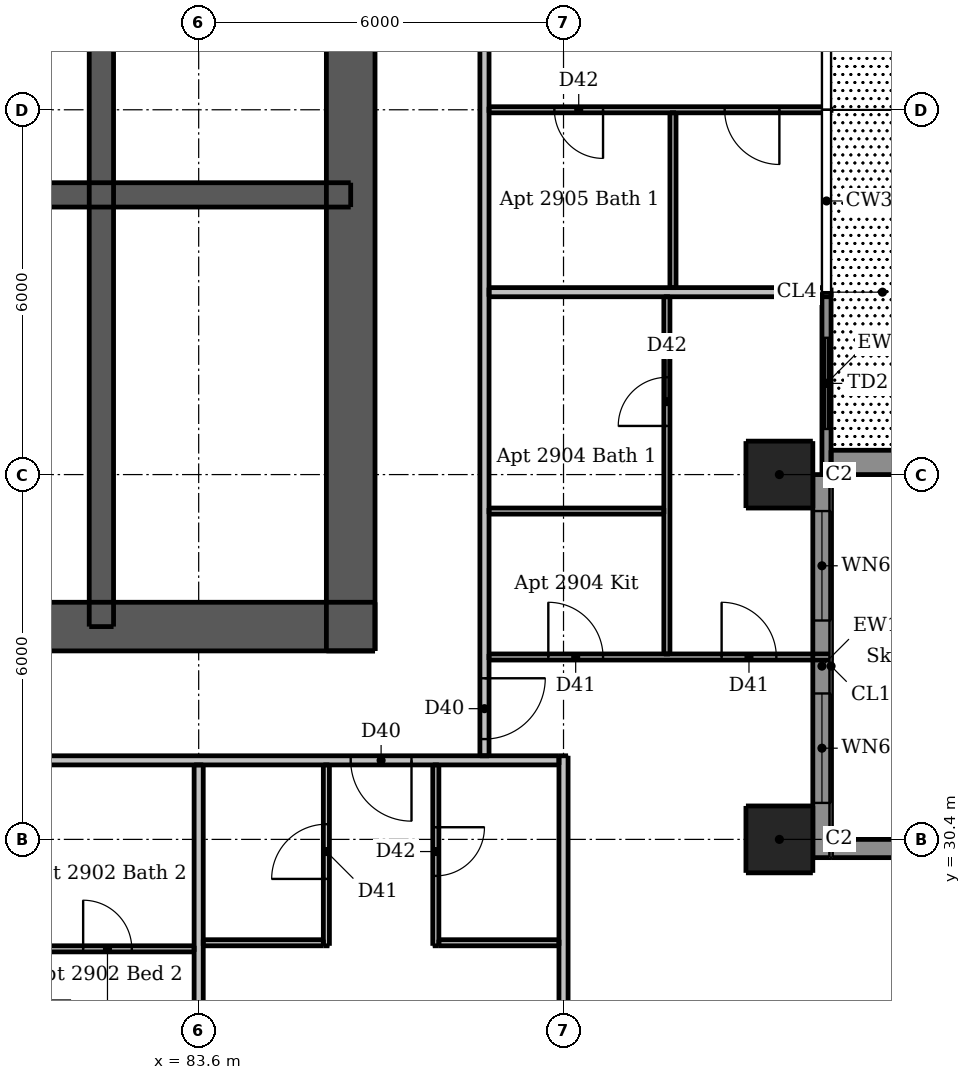
"""IFC4 building model, lengths in metres.
Left out: names, types, materials, properties, quantities, classifications, styles, units other than length and angle.
Written with IfcOpenShell. Run it as: python <this file> out.ifc"""

import sys

from ifc_helpers import new_model, si_unit, direction, frame, frame_2d, origin, origin_2d, place, context, subcontext, project, spatial, rectangle, extrude, element, fill, save


model = new_model("IFC4")
c1 = context("Model", 3, precision=1e-05, world=origin(), true_north=direction((0.0, 1.0)))
c2 = subcontext(c1, "Body", "Model", "MODEL_VIEW")
j1 = project(units=[si_unit("LENGTHUNIT", "METRE"), si_unit("PLANEANGLEUNIT", "RADIAN")], contexts=[c1])
p1 = place(None, origin())
s1 = spatial("IfcSite", under=j1, at=p1, CompositionType="ELEMENT")
p2 = place(p1, origin())
s2 = spatial("IfcBuilding", under=s1, at=p2, CompositionType="ELEMENT")
p3 = place(p2, frame((0.0, 0.0, 108.4)))
s3 = spatial("IfcBuildingStorey", under=s2, at=p3, CompositionType="ELEMENT", Elevation=108.4)
p4 = place(p3, frame((62.5, 33.9, 0.0), z_axis=(0.0, 0.0, 1.0), x_axis=(1.0, 0.0, 0.0)))
e1 = element("IfcWall", 1, at=p4, inside=s3, PredefinedType="SHEAR", context=c2, shape_type="SweptSolid", body=[
    extrude(rectangle(XDim=24.0, YDim=0.8, at=frame_2d((12.0, 0.0))), origin(), (0.0, 0.0, 1.0), 3.05),
])
p5 = place(p4, frame((2.0, 0.0, 0.0)))
e2 = element("IfcOpeningElement", 2, at=p5, cuts=e1, PredefinedType="OPENING", context=c2, shape_type="SweptSolid", body=[
    extrude(rectangle(XDim=1.1, YDim=2.1, at=frame_2d((0.55, 1.05))), frame((0.0, 0.41, 0.0), z_axis=(0.0, -1.0, 0.0), x_axis=(1.0, 0.0, 0.0)), (0.0, 0.0, 1.0), 0.82),
])
p6 = place(p4, frame((20.9, 0.0, 0.0)))
e3 = element("IfcOpeningElement", 3, at=p6, cuts=e1, PredefinedType="OPENING", context=c2, shape_type="SweptSolid", body=[
    extrude(rectangle(XDim=1.1, YDim=2.1, at=frame_2d((0.55, 1.05))), frame((0.0, 0.41, 0.0), z_axis=(0.0, -1.0, 0.0), x_axis=(1.0, 0.0, 0.0)), (0.0, 0.0, 1.0), 0.82),
])
p7 = place(p4, frame((8.0, 0.0, 0.0)))
e4 = element("IfcOpeningElement", 4, at=p7, cuts=e1, PredefinedType="OPENING", context=c2, shape_type="SweptSolid", body=[
    extrude(rectangle(XDim=1.1, YDim=2.1, at=frame_2d((0.55, 1.05))), frame((0.0, 0.41, 0.0), z_axis=(0.0, -1.0, 0.0), x_axis=(1.0, 0.0, 0.0)), (0.0, 0.0, 1.0), 0.82),
])
p8 = place(p4, frame((16.363, 0.0, 0.0)))
e5 = element("IfcOpeningElement", 5, at=p8, cuts=e1, PredefinedType="OPENING", context=c2, shape_type="SweptSolid", body=[
    extrude(rectangle(XDim=0.9, YDim=2.1, at=frame_2d((0.45, 1.05))), frame((0.0, 0.41, 0.0), z_axis=(0.0, -1.0, 0.0), x_axis=(1.0, 0.0, 0.0)), (0.0, 0.0, 1.0), 0.82),
])
p9 = place(p3, frame((86.1, 33.5, 0.0), z_axis=(0.0, 0.0, 1.0), x_axis=(0.0, 1.0, 0.0)))
e6 = element("IfcWall", 6, at=p9, inside=s3, PredefinedType="SHEAR", context=c2, shape_type="SweptSolid", body=[
    extrude(rectangle(XDim=24.0, YDim=0.8, at=frame_2d((12.0, 0.0))), origin(), (0.0, 0.0, 1.0), 3.05),
])
p10 = place(p9, frame((11.2, 0.0, 0.0)))
e7 = element("IfcOpeningElement", 7, at=p10, cuts=e6, PredefinedType="OPENING", context=c2, shape_type="SweptSolid", body=[
    extrude(rectangle(XDim=1.6, YDim=2.1, at=frame_2d((0.8, 1.05))), frame((0.0, 0.41, 0.0), z_axis=(0.0, -1.0, 0.0), x_axis=(1.0, 0.0, 0.0)), (0.0, 0.0, 1.0), 0.82),
])
p11 = place(p3, frame((62.9, 41.0, 0.0), z_axis=(0.0, 0.0, 1.0), x_axis=(1.0, 0.0, 0.0)))
e8 = element("IfcWall", 8, at=p11, inside=s3, PredefinedType="SHEAR", context=c2, shape_type="SweptSolid", body=[
    extrude(rectangle(XDim=23.2, YDim=0.4, at=frame_2d((11.6, 0.0))), origin(), (0.0, 0.0, 1.0), 3.05),
])
p12 = place(p3, frame((82.0, 33.9, 0.0), z_axis=(0.0, 0.0, 1.0), x_axis=(0.0, 1.0, 0.0)))
e9 = element("IfcWall", 9, at=p12, inside=s3, PredefinedType="SHEAR", context=c2, shape_type="SweptSolid", body=[
    extrude(rectangle(XDim=10.0, YDim=0.4, at=frame_2d((5.0, 0.0))), origin(), (0.0, 0.0, 1.0), 3.05),
])
for number, where, z_axis, x_axis in (
    (10, (93.15, 30.4, 0.0), (0.0, 0.0, 1.0), (1.0, 0.0, 0.0)),
    (11, (93.15, 36.4, 0.0), (0.0, 0.0, 1.0), (1.0, 0.0, 0.0)),
):
    element("IfcColumn", number, at=place(p3, frame(where, z_axis=z_axis, x_axis=x_axis)), inside=s3, PredefinedType="COLUMN", context=c2, shape_type="SweptSolid", body=[
        extrude(rectangle(XDim=1.1, YDim=1.1, at=origin_2d()), origin(), (0.0, 0.0, 1.0), 3.05),
    ])
p13 = place(p3, frame((100.0, 30.25, 0.0), z_axis=(0.0, 0.0, 1.0), x_axis=(-1.0, 0.0, 0.0)))
e12 = element("IfcWall", 12, at=p13, inside=s3, PredefinedType="SOLIDWALL", context=c2, shape_type="SweptSolid", body=[
    extrude(rectangle(XDim=6.0, YDim=0.3, at=frame_2d((3.0, 0.0))), origin(), (0.0, 0.0, 1.0), 3.05),
])
p14 = place(p13, frame((1.8, 0.0, 0.15)))
e13 = element("IfcOpeningElement", 13, at=p14, cuts=e12, PredefinedType="OPENING", context=c2, shape_type="SweptSolid", body=[
    extrude(rectangle(XDim=2.4, YDim=2.1, at=frame_2d((1.2, 1.05))), frame((0.0, 0.16, 0.0), z_axis=(0.0, -1.0, 0.0), x_axis=(1.0, 0.0, 0.0)), (0.0, 0.0, 1.0), 0.32),
])
p15 = place(p3, frame((93.85, 30.1, 0.0), z_axis=(0.0, 0.0, 1.0), x_axis=(0.0, 1.0, 0.0)))
e14 = element("IfcWall", 14, at=p15, inside=s3, PredefinedType="SOLIDWALL", context=c2, shape_type="SweptSolid", body=[
    extrude(rectangle(XDim=6.3, YDim=0.3, at=frame_2d((3.15, 0.0))), origin(), (0.0, 0.0, 1.0), 3.05),
])
p16 = place(p15, frame((0.9, 0.0, 0.15)))
e15 = element("IfcOpeningElement", 15, at=p16, cuts=e14, PredefinedType="OPENING", context=c2, shape_type="SweptSolid", body=[
    extrude(rectangle(XDim=1.8, YDim=2.1, at=frame_2d((0.9, 1.05))), frame((0.0, 0.16, 0.0), z_axis=(0.0, -1.0, 0.0), x_axis=(1.0, 0.0, 0.0)), (0.0, 0.0, 1.0), 0.32),
])
p17 = place(p15, frame((3.9, 0.0, 0.15)))
e16 = element("IfcOpeningElement", 16, at=p17, cuts=e14, PredefinedType="OPENING", context=c2, shape_type="SweptSolid", body=[
    extrude(rectangle(XDim=1.8, YDim=2.1, at=frame_2d((0.9, 1.05))), frame((0.0, 0.16, 0.0), z_axis=(0.0, -1.0, 0.0), x_axis=(1.0, 0.0, 0.0)), (0.0, 0.0, 1.0), 0.32),
])
p18 = place(p3, frame((93.925, 36.4, 0.0), z_axis=(0.0, 0.0, 1.0), x_axis=(0.0, 1.0, 0.0)))
e17 = element("IfcWall", 17, at=p18, inside=s3, PredefinedType="SOLIDWALL", context=c2, shape_type="SweptSolid", body=[
    extrude(rectangle(XDim=3.0, YDim=0.15, at=frame_2d((1.5, 0.0))), origin(), (0.0, 0.0, 1.0), 3.05),
])
p19 = place(p18, frame((0.75, 0.0, 0.0)))
e18 = element("IfcOpeningElement", 18, at=p19, cuts=e17, PredefinedType="OPENING", context=c2, shape_type="SweptSolid", body=[
    extrude(rectangle(XDim=1.5, YDim=2.4, at=frame_2d((0.75, 1.2))), frame((0.0, 0.085, 0.0), z_axis=(0.0, -1.0, 0.0), x_axis=(1.0, 0.0, 0.0)), (0.0, 0.0, 1.0), 0.17),
])
p20 = place(p3, frame((94.0, 36.6, 0.03), z_axis=(0.0, 0.0, 1.0), x_axis=(1.0, 0.0, 0.0)))
e19 = element("IfcWall", 19, at=p20, inside=s3, PredefinedType="PARAPET", context=c2, shape_type="SweptSolid", body=[
    extrude(rectangle(XDim=2.6, YDim=0.4, at=frame_2d((1.3, 0.0))), origin(), (0.0, 0.0, 1.0), 1.1),
])
p21 = place(p3, frame((85.7, 28.65, 0.0), z_axis=(0.0, 0.0, 1.0), x_axis=(0.0, 1.0, 0.0)))
e20 = element("IfcWall", 20, at=p21, inside=s3, PredefinedType="PARTITIONING", context=c2, shape_type="SweptSolid", body=[
    extrude(rectangle(XDim=2.975, YDim=0.1, at=frame_2d((1.488, 0.0))), origin(), (0.0, 0.0, 1.0), 3.05),
])
p22 = place(p21, frame((1.1, 0.0, 0.0)))
e21 = element("IfcOpeningElement", 21, at=p22, cuts=e20, PredefinedType="OPENING", context=c2, shape_type="SweptSolid", body=[
    extrude(rectangle(XDim=0.9, YDim=2.1, at=frame_2d((0.45, 1.05))), frame((0.0, 0.06, 0.0), z_axis=(0.0, -1.0, 0.0), x_axis=(1.0, 0.0, 0.0)), (0.0, 0.0, 1.0), 0.12),
])
p23 = place(p3, frame((87.5, 31.625, 0.0), z_axis=(0.0, 0.0, 1.0), x_axis=(0.0, -1.0, 0.0)))
e22 = element("IfcWall", 22, at=p23, inside=s3, PredefinedType="PARTITIONING", context=c2, shape_type="SweptSolid", body=[
    extrude(rectangle(XDim=2.975, YDim=0.1, at=frame_2d((1.488, 0.0))), origin(), (0.0, 0.0, 1.0), 3.05),
])
p24 = place(p23, frame((1.025, 0.0, 0.0)))
e23 = element("IfcOpeningElement", 23, at=p24, cuts=e22, PredefinedType="OPENING", context=c2, shape_type="SweptSolid", body=[
    extrude(rectangle(XDim=0.8, YDim=2.1, at=frame_2d((0.4, 1.05))), frame((0.0, 0.06, 0.0), z_axis=(0.0, -1.0, 0.0), x_axis=(1.0, 0.0, 0.0)), (0.0, 0.0, 1.0), 0.12),
])
p25 = place(p3, frame((91.3, 33.45, 0.0), z_axis=(0.0, 0.0, 1.0), x_axis=(0.0, 1.0, 0.0)))
e24 = element("IfcWall", 24, at=p25, inside=s3, PredefinedType="PARTITIONING", context=c2, shape_type="SweptSolid", body=[
    extrude(rectangle(XDim=5.875, YDim=0.1, at=frame_2d((2.938, 0.0))), origin(), (0.0, 0.0, 1.0), 3.05),
])
p26 = place(p25, frame((3.75, 0.0, 0.0)))
e25 = element("IfcOpeningElement", 25, at=p26, cuts=e24, PredefinedType="OPENING", context=c2, shape_type="SweptSolid", body=[
    extrude(rectangle(XDim=0.8, YDim=2.1, at=frame_2d((0.4, 1.05))), frame((0.0, 0.06, 0.0), z_axis=(0.0, -1.0, 0.0), x_axis=(1.0, 0.0, 0.0)), (0.0, 0.0, 1.0), 0.12),
])
p27 = place(p3, frame((91.4, 39.475, 0.0), z_axis=(0.0, 0.0, 1.0), x_axis=(0.0, 1.0, 0.0)))
e26 = element("IfcWall", 26, at=p27, inside=s3, PredefinedType="PARTITIONING", context=c2, shape_type="SweptSolid", body=[
    extrude(rectangle(XDim=2.875, YDim=0.1, at=frame_2d((1.438, 0.0))), origin(), (0.0, 0.0, 1.0), 3.05),
])
p28 = place(p3, frame((94.0, 42.4, 0.0), z_axis=(0.0, 0.0, 1.0), x_axis=(-1.0, 0.0, 0.0)))
e27 = element("IfcWall", 27, at=p28, inside=s3, PredefinedType="PARTITIONING", context=c2, shape_type="SweptSolid", body=[
    extrude(rectangle(XDim=5.625, YDim=0.1, at=frame_2d((2.812, 0.0))), origin(), (0.0, 0.0, 1.0), 2.516),
])
p29 = place(p28, frame((0.85, 0.0, 0.0)))
e28 = element("IfcOpeningElement", 28, at=p29, cuts=e27, PredefinedType="OPENING", context=c2, shape_type="SweptSolid", body=[
    extrude(rectangle(XDim=0.9, YDim=2.1, at=frame_2d((0.45, 1.05))), frame((0.0, 0.06, 0.0), z_axis=(0.0, -1.0, 0.0), x_axis=(1.0, 0.0, 0.0)), (0.0, 0.0, 1.0), 0.12),
])
p30 = place(p28, frame((3.75, 0.0, 0.0)))
e29 = element("IfcOpeningElement", 29, at=p30, cuts=e27, PredefinedType="OPENING", context=c2, shape_type="SweptSolid", body=[
    extrude(rectangle(XDim=0.8, YDim=2.1, at=frame_2d((0.4, 1.05))), frame((0.0, 0.06, 0.0), z_axis=(0.0, -1.0, 0.0), x_axis=(1.0, 0.0, 0.0)), (0.0, 0.0, 1.0), 0.12),
])
p31 = place(p3, frame((88.375, 35.8, 0.0), z_axis=(0.0, 0.0, 1.0), x_axis=(1.0, 0.0, 0.0)))
e30 = element("IfcWall", 30, at=p31, inside=s3, PredefinedType="PARTITIONING", context=c2, shape_type="SweptSolid", body=[
    extrude(rectangle(XDim=2.875, YDim=0.1, at=frame_2d((1.438, 0.0))), origin(), (0.0, 0.0, 1.0), 3.05),
])
p32 = place(p3, frame((88.375, 33.4, 0.0), z_axis=(0.0, 0.0, 1.0), x_axis=(1.0, 0.0, 0.0)))
e31 = element("IfcWall", 31, at=p32, inside=s3, PredefinedType="PARTITIONING", context=c2, shape_type="SweptSolid", body=[
    extrude(rectangle(XDim=5.625, YDim=0.1, at=frame_2d((2.812, 0.0))), origin(), (0.0, 0.0, 1.0), 3.05),
])
p33 = place(p32, frame((0.975, 0.0, 0.0)))
e32 = element("IfcOpeningElement", 32, at=p33, cuts=e31, PredefinedType="OPENING", context=c2, shape_type="SweptSolid", body=[
    extrude(rectangle(XDim=0.9, YDim=2.1, at=frame_2d((0.45, 1.05))), frame((0.0, 0.06, 0.0), z_axis=(0.0, -1.0, 0.0), x_axis=(1.0, 0.0, 0.0)), (0.0, 0.0, 1.0), 0.12),
])
p34 = place(p32, frame((3.825, 0.0, 0.0)))
e33 = element("IfcOpeningElement", 33, at=p34, cuts=e31, PredefinedType="OPENING", context=c2, shape_type="SweptSolid", body=[
    extrude(rectangle(XDim=0.9, YDim=2.1, at=frame_2d((0.45, 1.05))), frame((0.0, 0.06, 0.0), z_axis=(0.0, -1.0, 0.0), x_axis=(1.0, 0.0, 0.0)), (0.0, 0.0, 1.0), 0.12),
])
for number, where, z_axis, x_axis in (
    (34, (83.675, 28.7, 0.0), (0.0, 0.0, 1.0), (1.0, 0.0, 0.0)),
    (35, (87.55, 28.7, 0.0), (0.0, 0.0, 1.0), (1.0, 0.0, 0.0)),
):
    element("IfcWall", number, at=place(p3, frame(where, z_axis=z_axis, x_axis=x_axis)), inside=s3, PredefinedType="PARTITIONING", context=c2, shape_type="SweptSolid", body=[
        extrude(rectangle(XDim=1.975, YDim=0.1, at=frame_2d((0.987, 0.0))), origin(), (0.0, 0.0, 1.0), 3.05),
    ])
p35 = place(p3, frame((78.25, 28.6, 0.0), z_axis=(0.0, 0.0, 1.0), x_axis=(1.0, 0.0, 0.0)))
e36 = element("IfcWall", 36, at=p35, inside=s3, PredefinedType="PARTITIONING", context=c2, shape_type="SweptSolid", body=[
    extrude(rectangle(XDim=5.275, YDim=0.1, at=frame_2d((2.637, 0.0))), origin(), (0.0, 0.0, 1.0), 3.05),
])
p36 = place(p35, frame((3.45, 0.0, 0.0)))
e37 = element("IfcOpeningElement", 37, at=p36, cuts=e36, PredefinedType="OPENING", context=c2, shape_type="SweptSolid", body=[
    extrude(rectangle(XDim=0.8, YDim=2.1, at=frame_2d((0.4, 1.05))), frame((0.0, 0.06, 0.0), z_axis=(0.0, -1.0, 0.0), x_axis=(1.0, 0.0, 0.0)), (0.0, 0.0, 1.0), 0.12),
])
p37 = place(p3, frame((83.6, 26.0, 0.0), z_axis=(0.0, 0.0, 1.0), x_axis=(0.0, 1.0, 0.0)))
e38 = element("IfcWall", 38, at=p37, inside=s3, PredefinedType="PARTITIONING", context=c2, shape_type="SweptSolid", body=[
    extrude(rectangle(XDim=5.625, YDim=0.15, at=frame_2d((2.812, 0.0))), origin(), (0.0, 0.0, 1.0), 2.59),
])
p38 = place(p3, frame((88.3, 60.475, 0.0), z_axis=(0.0, 0.0, 1.0), x_axis=(0.0, -1.0, 0.0)))
e39 = element("IfcWall", 39, at=p38, inside=s3, PredefinedType="PARTITIONING", context=c2, shape_type="SweptSolid", body=[
    extrude(rectangle(XDim=28.7, YDim=0.15, at=frame_2d((14.35, 0.0))), origin(), (0.0, 0.0, 1.0), 3.05),
])
p39 = place(p38, frame((27.425, 0.0, 0.0)))
e40 = element("IfcOpeningElement", 40, at=p39, cuts=e39, PredefinedType="OPENING", context=c2, shape_type="SweptSolid", body=[
    extrude(rectangle(XDim=1.0, YDim=2.1, at=frame_2d((0.5, 1.05))), frame((0.0, 0.085, 0.0), z_axis=(0.0, -1.0, 0.0), x_axis=(1.0, 0.0, 0.0)), (0.0, 0.0, 1.0), 0.17),
])
p40 = place(p38, frame((14.575, 0.0, 0.0)))
e41 = element("IfcOpeningElement", 41, at=p40, cuts=e39, PredefinedType="OPENING", context=c2, shape_type="SweptSolid", body=[
    extrude(rectangle(XDim=1.0, YDim=2.1, at=frame_2d((0.5, 1.05))), frame((0.0, 0.085, 0.0), z_axis=(0.0, -1.0, 0.0), x_axis=(1.0, 0.0, 0.0)), (0.0, 0.0, 1.0), 0.17),
])
p41 = place(p38, frame((2.575, 0.0, 0.0)))
e42 = element("IfcOpeningElement", 42, at=p41, cuts=e39, PredefinedType="OPENING", context=c2, shape_type="SweptSolid", body=[
    extrude(rectangle(XDim=1.0, YDim=2.1, at=frame_2d((0.5, 1.05))), frame((0.0, 0.085, 0.0), z_axis=(0.0, -1.0, 0.0), x_axis=(1.0, 0.0, 0.0)), (0.0, 0.0, 1.0), 0.17),
])
p42 = place(p3, frame((89.6, 26.0, 0.0), z_axis=(0.0, 0.0, 1.0), x_axis=(0.0, 1.0, 0.0)))
e43 = element("IfcWall", 43, at=p42, inside=s3, PredefinedType="PARTITIONING", context=c2, shape_type="SweptSolid", body=[
    extrude(rectangle(XDim=5.775, YDim=0.15, at=frame_2d((2.887, 0.0))), origin(), (0.0, 0.0, 1.0), 2.516),
])
p43 = place(p3, frame((88.375, 39.4, 0.0), z_axis=(0.0, 0.0, 1.0), x_axis=(1.0, 0.0, 0.0)))
e44 = element("IfcWall", 44, at=p43, inside=s3, PredefinedType="PARTITIONING", context=c2, shape_type="SweptSolid", body=[
    extrude(rectangle(XDim=5.625, YDim=0.15, at=frame_2d((2.812, 0.0))), origin(), (0.0, 0.0, 1.0), 3.05),
])
p44 = place(p3, frame((89.525, 31.7, 0.0), z_axis=(0.0, 0.0, 1.0), x_axis=(-1.0, 0.0, 0.0)))
e45 = element("IfcWall", 45, at=p44, inside=s3, PredefinedType="PARTITIONING", context=c2, shape_type="SweptSolid", body=[
    extrude(rectangle(XDim=28.75, YDim=0.15, at=frame_2d((14.375, 0.0))), origin(), (0.0, 0.0, 1.0), 3.05),
])
p45 = place(p44, frame((27.375, 0.0, 0.0)))
e46 = element("IfcOpeningElement", 46, at=p45, cuts=e45, PredefinedType="OPENING", context=c2, shape_type="SweptSolid", body=[
    extrude(rectangle(XDim=1.0, YDim=2.1, at=frame_2d((0.5, 1.05))), frame((0.0, 0.085, 0.0), z_axis=(0.0, -1.0, 0.0), x_axis=(1.0, 0.0, 0.0)), (0.0, 0.0, 1.0), 0.17),
])
p46 = place(p44, frame((12.625, 0.0, 0.0)))
e47 = element("IfcOpeningElement", 47, at=p46, cuts=e45, PredefinedType="OPENING", context=c2, shape_type="SweptSolid", body=[
    extrude(rectangle(XDim=1.0, YDim=2.1, at=frame_2d((0.5, 1.05))), frame((0.0, 0.085, 0.0), z_axis=(0.0, -1.0, 0.0), x_axis=(1.0, 0.0, 0.0)), (0.0, 0.0, 1.0), 0.17),
])
p47 = place(p44, frame((2.425, 0.0, 0.0)))
e48 = element("IfcOpeningElement", 48, at=p47, cuts=e45, PredefinedType="OPENING", context=c2, shape_type="SweptSolid", body=[
    extrude(rectangle(XDim=1.0, YDim=2.1, at=frame_2d((0.5, 1.05))), frame((0.0, 0.085, 0.0), z_axis=(0.0, -1.0, 0.0), x_axis=(1.0, 0.0, 0.0)), (0.0, 0.0, 1.0), 0.17),
])
p48 = place(p16, origin())
e49 = element("IfcWindow", 49, at=p48, inside=s3, PartitioningType="DOUBLE_PANEL_VERTICAL", PredefinedType="WINDOW", context=c2, shape_type="SweptSolid", body=[
    extrude(rectangle(XDim=1.8, YDim=2.1, at=frame_2d((0.9, 1.05))), frame((0.0, 0.03, 0.0), z_axis=(0.0, -1.0, 0.0), x_axis=(1.0, 0.0, 0.0)), (0.0, 0.0, 1.0), 0.06),
])
fill(e15, e49)
p49 = place(p17, origin())
e50 = element("IfcWindow", 50, at=p49, inside=s3, PartitioningType="DOUBLE_PANEL_VERTICAL", PredefinedType="WINDOW", context=c2, shape_type="SweptSolid", body=[
    extrude(rectangle(XDim=1.8, YDim=2.1, at=frame_2d((0.9, 1.05))), frame((0.0, 0.03, 0.0), z_axis=(0.0, -1.0, 0.0), x_axis=(1.0, 0.0, 0.0)), (0.0, 0.0, 1.0), 0.06),
])
fill(e16, e50)
p50 = place(p19, origin())
e51 = element("IfcDoor", 51, at=p50, inside=s3, OperationType="DOUBLE_DOOR_SLIDING", PredefinedType="DOOR", context=c2, shape_type="SweptSolid", body=[
    extrude(rectangle(XDim=1.5, YDim=2.4, at=frame_2d((0.75, 1.2))), frame((0.0, 0.025, 0.0), z_axis=(0.0, -1.0, 0.0), x_axis=(1.0, 0.0, 0.0)), (0.0, 0.0, 1.0), 0.05),
])
fill(e18, e51)
p51 = place(p6, origin())
e52 = element("IfcDoor", 52, at=p51, inside=s3, OperationType="SINGLE_SWING_RIGHT", PredefinedType="DOOR", context=c2, shape_type="SweptSolid", body=[
    extrude(rectangle(XDim=1.1, YDim=2.1, at=frame_2d((0.55, 1.05))), frame((0.0, 0.388, 0.0), z_axis=(0.0, -1.0, 0.0), x_axis=(1.0, 0.0, 0.0)), (0.0, 0.0, 1.0), 0.05),
])
fill(e3, e52)
p52 = place(p36, origin())
e53 = element("IfcDoor", 53, at=p52, inside=s3, OperationType="SINGLE_SWING_LEFT", PredefinedType="DOOR", context=c2, shape_type="SweptSolid", body=[
    extrude(rectangle(XDim=0.8, YDim=2.1, at=frame_2d((0.4, 1.05))), frame((0.0, 0.025, 0.0), z_axis=(0.0, -1.0, 0.0), x_axis=(1.0, 0.0, 0.0)), (0.0, 0.0, 1.0), 0.05),
])
fill(e37, e53)
p53 = place(p47, origin())
e54 = element("IfcDoor", 54, at=p53, inside=s3, OperationType="SINGLE_SWING_LEFT", PredefinedType="DOOR", context=c2, shape_type="SweptSolid", body=[
    extrude(rectangle(XDim=1.0, YDim=2.1, at=frame_2d((0.5, 1.05))), frame((0.0, 0.025, 0.0), z_axis=(0.0, -1.0, 0.0), x_axis=(1.0, 0.0, 0.0)), (0.0, 0.0, 1.0), 0.05),
])
fill(e48, e54)
p54 = place(p22, origin())
e55 = element("IfcDoor", 55, at=p54, inside=s3, OperationType="SINGLE_SWING_LEFT", PredefinedType="DOOR", context=c2, shape_type="SweptSolid", body=[
    extrude(rectangle(XDim=0.9, YDim=2.1, at=frame_2d((0.45, 1.05))), frame((0.0, 0.025, 0.0), z_axis=(0.0, -1.0, 0.0), x_axis=(1.0, 0.0, 0.0)), (0.0, 0.0, 1.0), 0.05),
])
fill(e21, e55)
p55 = place(p24, origin())
e56 = element("IfcDoor", 56, at=p55, inside=s3, OperationType="SINGLE_SWING_LEFT", PredefinedType="DOOR", context=c2, shape_type="SweptSolid", body=[
    extrude(rectangle(XDim=0.8, YDim=2.1, at=frame_2d((0.4, 1.05))), frame((0.0, 0.025, 0.0), z_axis=(0.0, -1.0, 0.0), x_axis=(1.0, 0.0, 0.0)), (0.0, 0.0, 1.0), 0.05),
])
fill(e23, e56)
p56 = place(p39, origin())
e57 = element("IfcDoor", 57, at=p56, inside=s3, OperationType="SINGLE_SWING_LEFT", PredefinedType="DOOR", context=c2, shape_type="SweptSolid", body=[
    extrude(rectangle(XDim=1.0, YDim=2.1, at=frame_2d((0.5, 1.05))), frame((0.0, 0.025, 0.0), z_axis=(0.0, -1.0, 0.0), x_axis=(1.0, 0.0, 0.0)), (0.0, 0.0, 1.0), 0.05),
])
fill(e40, e57)
p57 = place(p33, origin())
e58 = element("IfcDoor", 58, at=p57, inside=s3, OperationType="SINGLE_SWING_LEFT", PredefinedType="DOOR", context=c2, shape_type="SweptSolid", body=[
    extrude(rectangle(XDim=0.9, YDim=2.1, at=frame_2d((0.45, 1.05))), frame((0.0, 0.025, 0.0), z_axis=(0.0, -1.0, 0.0), x_axis=(1.0, 0.0, 0.0)), (0.0, 0.0, 1.0), 0.05),
])
fill(e32, e58)
p58 = place(p34, origin())
e59 = element("IfcDoor", 59, at=p58, inside=s3, OperationType="SINGLE_SWING_LEFT", PredefinedType="DOOR", context=c2, shape_type="SweptSolid", body=[
    extrude(rectangle(XDim=0.9, YDim=2.1, at=frame_2d((0.45, 1.05))), frame((0.0, 0.025, 0.0), z_axis=(0.0, -1.0, 0.0), x_axis=(1.0, 0.0, 0.0)), (0.0, 0.0, 1.0), 0.05),
])
fill(e33, e59)
p59 = place(p26, origin())
e60 = element("IfcDoor", 60, at=p59, inside=s3, OperationType="SINGLE_SWING_LEFT", PredefinedType="DOOR", context=c2, shape_type="SweptSolid", body=[
    extrude(rectangle(XDim=0.8, YDim=2.1, at=frame_2d((0.4, 1.05))), frame((0.0, 0.025, 0.0), z_axis=(0.0, -1.0, 0.0), x_axis=(1.0, 0.0, 0.0)), (0.0, 0.0, 1.0), 0.05),
])
fill(e25, e60)
p60 = place(p29, origin())
e61 = element("IfcDoor", 61, at=p60, inside=s3, OperationType="SINGLE_SWING_LEFT", PredefinedType="DOOR", context=c2, shape_type="SweptSolid", body=[
    extrude(rectangle(XDim=0.9, YDim=2.1, at=frame_2d((0.45, 1.05))), frame((0.0, 0.025, 0.0), z_axis=(0.0, -1.0, 0.0), x_axis=(1.0, 0.0, 0.0)), (0.0, 0.0, 1.0), 0.05),
])
fill(e28, e61)
p61 = place(p30, origin())
e62 = element("IfcDoor", 62, at=p61, inside=s3, OperationType="SINGLE_SWING_LEFT", PredefinedType="DOOR", context=c2, shape_type="SweptSolid", body=[
    extrude(rectangle(XDim=0.8, YDim=2.1, at=frame_2d((0.4, 1.05))), frame((0.0, 0.025, 0.0), z_axis=(0.0, -1.0, 0.0), x_axis=(1.0, 0.0, 0.0)), (0.0, 0.0, 1.0), 0.05),
])
fill(e29, e62)
save(model, sys.argv[1])
